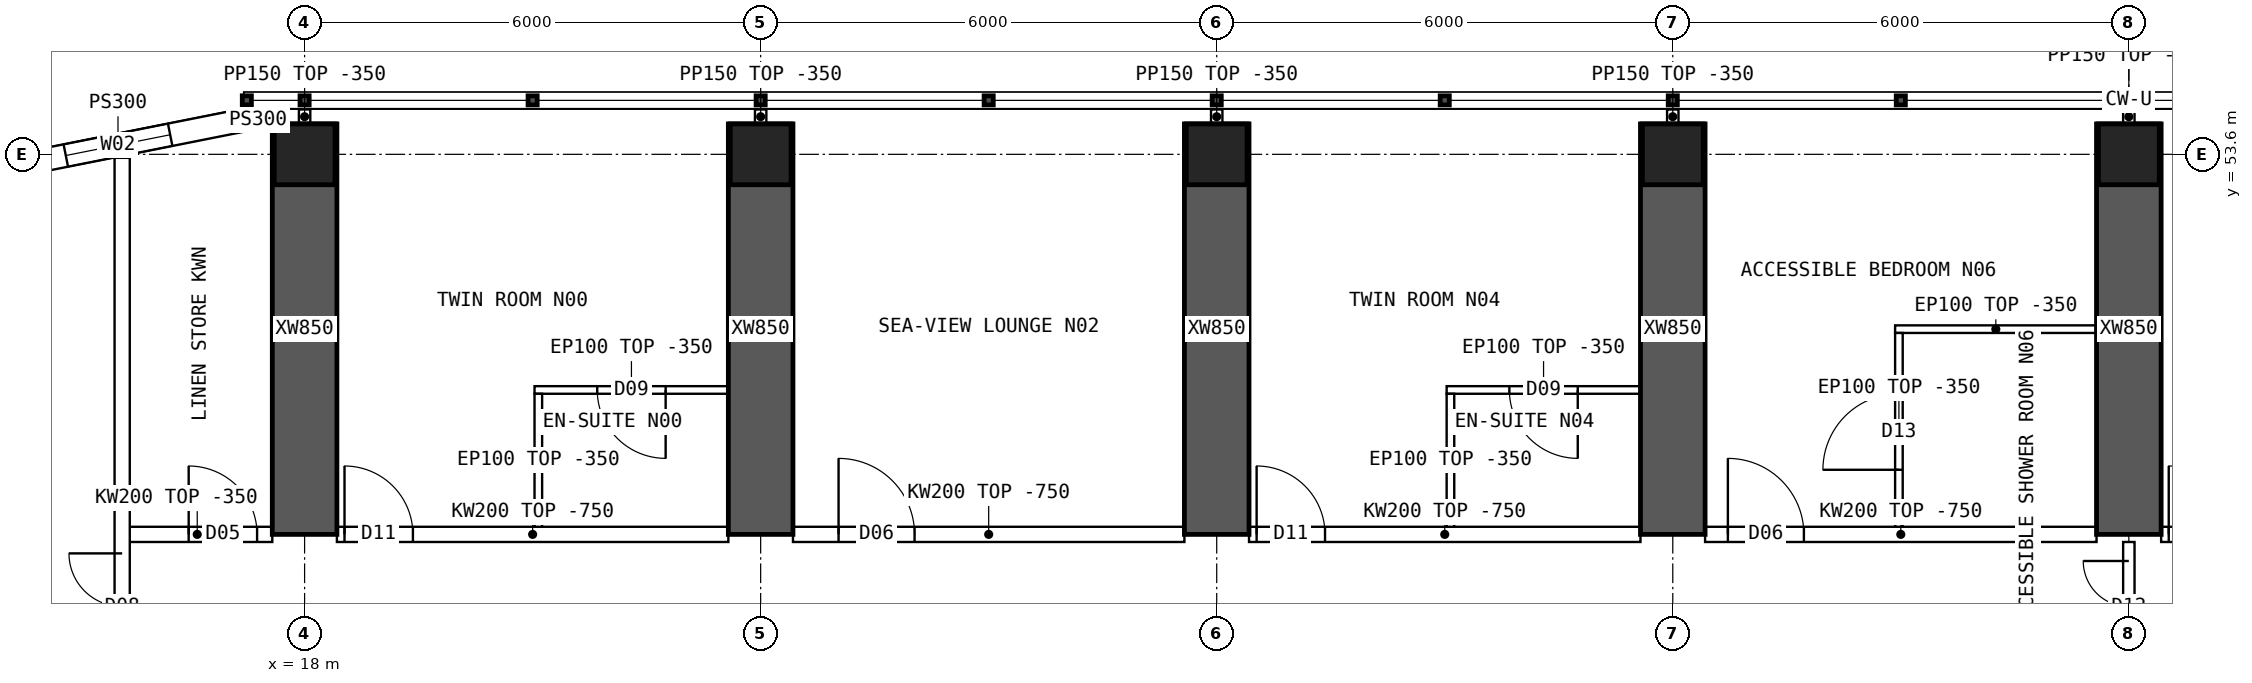
"""IFC4 building model, lengths in metres.
Left out: names, types, materials, properties, quantities, classifications, styles, units other than length and angle.
Written with IfcOpenShell. Run it as: python <this file> out.ifc"""

import sys

from ifc_helpers import new_model, si_unit, direction, frame, frame_2d, origin, origin_2d, place, context, subcontext, project, spatial, polyline, rectangle, hollow_rectangle, outline, extrude, element, fill, save


model = new_model("IFC4")
c1 = context("Model", 3, precision=1e-05, world=origin(), true_north=direction((0.0, 1.0)))
c2 = subcontext(c1, "Body", "Model", "MODEL_VIEW")
j1 = project(units=[si_unit("LENGTHUNIT", "METRE"), si_unit("PLANEANGLEUNIT", "RADIAN")], contexts=[c1])
p1 = place(None, origin())
s1 = spatial("IfcSite", under=j1, at=p1, CompositionType="ELEMENT")
p2 = place(p1, origin())
s2 = spatial("IfcBuilding", under=s1, at=p2, CompositionType="ELEMENT")
p3 = place(p2, frame((0.0, 0.0, 197.35)))
s3 = spatial("IfcBuildingStorey", under=s2, at=p3, CompositionType="ELEMENT", Elevation=197.35)
for number, where, z_axis, x_axis in (
    (1, (18.0, 53.6, 0.0), (0.0, 0.0, 1.0), (1.0, 0.0, 0.0)),
    (2, (24.0, 53.6, 0.0), (0.0, 0.0, 1.0), (1.0, 0.0, 0.0)),
    (3, (30.0, 53.6, 0.0), (0.0, 0.0, 1.0), (1.0, 0.0, 0.0)),
    (4, (36.0, 53.6, 0.0), (0.0, 0.0, 1.0), (1.0, 0.0, 0.0)),
    (5, (42.0, 53.6, 0.0), (0.0, 0.0, 1.0), (1.0, 0.0, 0.0)),
):
    element("IfcColumn", number, at=place(p3, frame(where, z_axis=z_axis, x_axis=x_axis)), inside=s3, PredefinedType="COLUMN", context=c2, shape_type="SweptSolid", body=[
        extrude(hollow_rectangle(XDim=0.8, YDim=0.8, WallThickness=0.08, at=origin_2d()), origin(), (0.0, 0.0, 1.0), 3.75),
    ])
for number, where, z_axis, x_axis in (
    (6, (18.0, 48.6, 0.0), (0.0, 0.0, 1.0), (0.0, 1.0, 0.0)),
    (7, (24.0, 48.6, 0.0), (0.0, 0.0, 1.0), (0.0, 1.0, 0.0)),
    (8, (30.0, 48.6, 0.0), (0.0, 0.0, 1.0), (0.0, 1.0, 0.0)),
    (9, (36.0, 48.6, 0.0), (0.0, 0.0, 1.0), (0.0, 1.0, 0.0)),
    (10, (42.0, 48.6, 0.0), (0.0, 0.0, 1.0), (0.0, 1.0, 0.0)),
):
    element("IfcWall", number, at=place(p3, frame(where, z_axis=z_axis, x_axis=x_axis)), inside=s3, PredefinedType="SHEAR", context=c2, shape_type="SweptSolid", body=[
        extrude(rectangle(XDim=5.4, YDim=0.85, at=frame_2d((2.7, 0.0))), origin(), (0.0, 0.0, 1.0), 3.75),
    ])
p4 = place(p3, frame((17.2, 54.05, 0.0), z_axis=(0.0, 0.0, 1.0), x_axis=(-0.98078325777, -0.195100490205, 0.0)))
e11 = element("IfcWall", 11, at=p4, inside=s3, PredefinedType="SOLIDWALL", context=c2, shape_type="SweptSolid", body=[
    extrude(outline(polyline([(-0.03, -0.15), (3.405, -0.15), (3.345, 0.15), (0.03, 0.15), (-0.03, -0.15)])), origin(), (0.0, 0.0, 1.0), 3.4),
])
p5 = place(p4, frame((0.988, 0.0, 0.9)))
e12 = element("IfcOpeningElement", 12, at=p5, cuts=e11, PredefinedType="OPENING", context=c2, shape_type="SweptSolid", body=[
    extrude(rectangle(XDim=1.4, YDim=1.8, at=frame_2d((0.7, 0.9))), frame((0.0, 0.16, 0.0), z_axis=(0.0, -1.0, 0.0), x_axis=(1.0, 0.0, 0.0)), (0.0, 0.0, 1.0), 0.32),
])
p6 = place(p3, frame((17.2, 54.05, 0.0), z_axis=(0.0, 0.0, 1.0), x_axis=(1.0, 0.0, 0.0)))
e13 = element("IfcWall", 13, at=p6, inside=s3, PredefinedType="SOLIDWALL", context=c2, shape_type="SweptSolid", body=[
    extrude(rectangle(XDim=0.375, YDim=0.3, at=frame_2d((0.188, 0.0))), origin(), (0.0, 0.0, 1.0), 3.4),
])
p7 = place(p3, frame((15.6, 48.6, 0.0), z_axis=(0.0, 0.0, 1.0), x_axis=(1.0, 0.0, 0.0)))
e14 = element("IfcWall", 14, at=p7, inside=s3, PredefinedType="SOLIDWALL", context=c2, shape_type="SweptSolid", body=[
    extrude(rectangle(XDim=1.975, YDim=0.2, at=frame_2d((0.987, 0.0))), origin(), (0.0, 0.0, 1.0), 3.4),
])
p8 = place(p7, frame((0.875, 0.0, 0.0)))
e15 = element("IfcOpeningElement", 15, at=p8, cuts=e14, PredefinedType="OPENING", context=c2, shape_type="SweptSolid", body=[
    extrude(rectangle(XDim=0.9, YDim=2.1, at=frame_2d((0.45, 1.05))), frame((0.0, 0.11, 0.0), z_axis=(0.0, -1.0, 0.0), x_axis=(1.0, 0.0, 0.0)), (0.0, 0.0, 1.0), 0.22),
])
p9 = place(p3, frame((18.425, 48.6, 0.0), z_axis=(0.0, 0.0, 1.0), x_axis=(1.0, 0.0, 0.0)))
e16 = element("IfcWall", 16, at=p9, inside=s3, PredefinedType="SOLIDWALL", context=c2, shape_type="SweptSolid", body=[
    extrude(outline(polyline([(0.0, 0.0), (5.15, 0.0), (5.15, 3.0), (0.0, 3.0), (0.0, 0.0)])), frame((0.0, 0.1, 0.0), z_axis=(0.0, -1.0, 0.0), x_axis=(1.0, 0.0, 0.0)), (0.0, 0.0, 1.0), 0.2),
])
p10 = place(p9, frame((0.1, 0.0, 0.0)))
e17 = element("IfcOpeningElement", 17, at=p10, cuts=e16, PredefinedType="OPENING", context=c2, shape_type="SweptSolid", body=[
    extrude(rectangle(XDim=0.9, YDim=2.1, at=frame_2d((0.45, 1.05))), frame((0.0, 0.11, 0.0), z_axis=(0.0, -1.0, 0.0), x_axis=(1.0, 0.0, 0.0)), (0.0, 0.0, 1.0), 0.22),
])
p11 = place(p3, frame((24.425, 48.6, 0.0), z_axis=(0.0, 0.0, 1.0), x_axis=(1.0, 0.0, 0.0)))
e18 = element("IfcWall", 18, at=p11, inside=s3, PredefinedType="SOLIDWALL", context=c2, shape_type="SweptSolid", body=[
    extrude(outline(polyline([(0.0, 0.0), (5.15, 0.0), (5.15, 3.0), (0.0, 3.0), (0.0, 0.0)])), frame((0.0, 0.1, 0.0), z_axis=(0.0, -1.0, 0.0), x_axis=(1.0, 0.0, 0.0)), (0.0, 0.0, 1.0), 0.2),
])
p12 = place(p11, frame((0.6, 0.0, 0.0)))
e19 = element("IfcOpeningElement", 19, at=p12, cuts=e18, PredefinedType="OPENING", context=c2, shape_type="SweptSolid", body=[
    extrude(rectangle(XDim=1.0, YDim=2.1, at=frame_2d((0.5, 1.05))), frame((0.0, 0.11, 0.0), z_axis=(0.0, -1.0, 0.0), x_axis=(1.0, 0.0, 0.0)), (0.0, 0.0, 1.0), 0.22),
])
p13 = place(p3, frame((30.425, 48.6, 0.0), z_axis=(0.0, 0.0, 1.0), x_axis=(1.0, 0.0, 0.0)))
e20 = element("IfcWall", 20, at=p13, inside=s3, PredefinedType="SOLIDWALL", context=c2, shape_type="SweptSolid", body=[
    extrude(outline(polyline([(0.0, 0.0), (5.15, 0.0), (5.15, 3.0), (0.0, 3.0), (0.0, 0.0)])), frame((0.0, 0.1, 0.0), z_axis=(0.0, -1.0, 0.0), x_axis=(1.0, 0.0, 0.0)), (0.0, 0.0, 1.0), 0.2),
])
p14 = place(p13, frame((0.1, 0.0, 0.0)))
e21 = element("IfcOpeningElement", 21, at=p14, cuts=e20, PredefinedType="OPENING", context=c2, shape_type="SweptSolid", body=[
    extrude(rectangle(XDim=0.9, YDim=2.1, at=frame_2d((0.45, 1.05))), frame((0.0, 0.11, 0.0), z_axis=(0.0, -1.0, 0.0), x_axis=(1.0, 0.0, 0.0)), (0.0, 0.0, 1.0), 0.22),
])
p15 = place(p3, frame((36.425, 48.6, 0.0), z_axis=(0.0, 0.0, 1.0), x_axis=(1.0, 0.0, 0.0)))
e22 = element("IfcWall", 22, at=p15, inside=s3, PredefinedType="SOLIDWALL", context=c2, shape_type="SweptSolid", body=[
    extrude(outline(polyline([(0.0, 0.0), (5.15, 0.0), (5.15, 3.0), (0.0, 3.0), (0.0, 0.0)])), frame((0.0, 0.1, 0.0), z_axis=(0.0, -1.0, 0.0), x_axis=(1.0, 0.0, 0.0)), (0.0, 0.0, 1.0), 0.2),
])
p16 = place(p15, frame((0.3, 0.0, 0.0)))
e23 = element("IfcOpeningElement", 23, at=p16, cuts=e22, PredefinedType="OPENING", context=c2, shape_type="SweptSolid", body=[
    extrude(rectangle(XDim=1.0, YDim=2.1, at=frame_2d((0.5, 1.05))), frame((0.0, 0.11, 0.0), z_axis=(0.0, -1.0, 0.0), x_axis=(1.0, 0.0, 0.0)), (0.0, 0.0, 1.0), 0.22),
])
p17 = place(p3, frame((42.425, 48.6, 0.0), z_axis=(0.0, 0.0, 1.0), x_axis=(1.0, 0.0, 0.0)))
e24 = element("IfcWall", 24, at=p17, inside=s3, PredefinedType="SOLIDWALL", context=c2, shape_type="SweptSolid", body=[
    extrude(outline(polyline([(0.0, 0.0), (5.15, 0.0), (5.15, 3.0), (0.0, 3.0), (0.0, 0.0)])), frame((0.0, 0.1, 0.0), z_axis=(0.0, -1.0, 0.0), x_axis=(1.0, 0.0, 0.0)), (0.0, 0.0, 1.0), 0.2),
])
p18 = place(p17, frame((0.1, 0.0, 0.0)))
e25 = element("IfcOpeningElement", 25, at=p18, cuts=e24, PredefinedType="OPENING", context=c2, shape_type="SweptSolid", body=[
    extrude(rectangle(XDim=0.9, YDim=2.1, at=frame_2d((0.45, 1.05))), frame((0.0, 0.11, 0.0), z_axis=(0.0, -1.0, 0.0), x_axis=(1.0, 0.0, 0.0)), (0.0, 0.0, 1.0), 0.22),
])
p19 = place(p3, frame((21.025, 50.5, 0.0), z_axis=(0.0, 0.0, 1.0), x_axis=(1.0, 0.0, 0.0)))
e26 = element("IfcWall", 26, at=p19, inside=s3, PredefinedType="PARTITIONING", context=c2, shape_type="SweptSolid", body=[
    extrude(rectangle(XDim=2.55, YDim=0.1, at=frame_2d((1.275, 0.0))), origin(), (0.0, 0.0, 1.0), 3.4),
])
p20 = place(p19, frame((0.825, 0.0, 0.0)))
e27 = element("IfcOpeningElement", 27, at=p20, cuts=e26, PredefinedType="OPENING", context=c2, shape_type="SweptSolid", body=[
    extrude(rectangle(XDim=0.9, YDim=2.1, at=frame_2d((0.45, 1.05))), frame((0.0, 0.06, 0.0), z_axis=(0.0, -1.0, 0.0), x_axis=(1.0, 0.0, 0.0)), (0.0, 0.0, 1.0), 0.12),
])
p21 = place(p3, frame((21.075, 50.45, 0.0), z_axis=(0.0, 0.0, 1.0), x_axis=(0.0, -1.0, 0.0)))
e28 = element("IfcWall", 28, at=p21, inside=s3, PredefinedType="PARTITIONING", context=c2, shape_type="SweptSolid", body=[
    extrude(outline(polyline([(0.0, 0.0), (1.75, 0.0), (1.75, 3.0), (1.702, 3.0), (1.7, 3.4), (0.0, 3.4), (0.0, 0.0)])), frame((0.0, 0.05, 0.0), z_axis=(0.0, -1.0, 0.0), x_axis=(1.0, 0.0, 0.0)), (0.0, 0.0, 1.0), 0.1),
])
p22 = place(p3, frame((33.025, 50.5, 0.0), z_axis=(0.0, 0.0, 1.0), x_axis=(1.0, 0.0, 0.0)))
e29 = element("IfcWall", 29, at=p22, inside=s3, PredefinedType="PARTITIONING", context=c2, shape_type="SweptSolid", body=[
    extrude(rectangle(XDim=2.55, YDim=0.1, at=frame_2d((1.275, 0.0))), origin(), (0.0, 0.0, 1.0), 3.4),
])
p23 = place(p22, frame((0.825, 0.0, 0.0)))
e30 = element("IfcOpeningElement", 30, at=p23, cuts=e29, PredefinedType="OPENING", context=c2, shape_type="SweptSolid", body=[
    extrude(rectangle(XDim=0.9, YDim=2.1, at=frame_2d((0.45, 1.05))), frame((0.0, 0.06, 0.0), z_axis=(0.0, -1.0, 0.0), x_axis=(1.0, 0.0, 0.0)), (0.0, 0.0, 1.0), 0.12),
])
p24 = place(p3, frame((33.075, 50.45, 0.0), z_axis=(0.0, 0.0, 1.0), x_axis=(0.0, -1.0, 0.0)))
e31 = element("IfcWall", 31, at=p24, inside=s3, PredefinedType="PARTITIONING", context=c2, shape_type="SweptSolid", body=[
    extrude(outline(polyline([(0.0, 0.0), (1.75, 0.0), (1.75, 3.0), (1.702, 3.0), (1.7, 3.4), (0.0, 3.4), (0.0, 0.0)])), frame((0.0, 0.05, 0.0), z_axis=(0.0, -1.0, 0.0), x_axis=(1.0, 0.0, 0.0)), (0.0, 0.0, 1.0), 0.1),
])
p25 = place(p3, frame((38.925, 51.3, 0.0), z_axis=(0.0, 0.0, 1.0), x_axis=(1.0, 0.0, 0.0)))
e32 = element("IfcWall", 32, at=p25, inside=s3, PredefinedType="PARTITIONING", context=c2, shape_type="SweptSolid", body=[
    extrude(rectangle(XDim=2.65, YDim=0.1, at=frame_2d((1.325, 0.0))), origin(), (0.0, 0.0, 1.0), 3.4),
])
p26 = place(p3, frame((38.975, 51.25, 0.0), z_axis=(0.0, 0.0, 1.0), x_axis=(0.0, -1.0, 0.0)))
e33 = element("IfcWall", 33, at=p26, inside=s3, PredefinedType="PARTITIONING", context=c2, shape_type="SweptSolid", body=[
    extrude(outline(polyline([(0.0, 0.0), (2.55, 0.0), (2.55, 3.0), (2.502, 3.0), (2.5, 3.4), (0.0, 3.4), (0.0, 0.0)])), frame((0.0, 0.05, 0.0), z_axis=(0.0, -1.0, 0.0), x_axis=(1.0, 0.0, 0.0)), (0.0, 0.0, 1.0), 0.1),
])
p27 = place(p26, frame((0.8, 0.0, 0.0)))
e34 = element("IfcOpeningElement", 34, at=p27, cuts=e33, PredefinedType="OPENING", context=c2, shape_type="SweptSolid", body=[
    extrude(rectangle(XDim=1.0, YDim=2.1, at=frame_2d((0.5, 1.05))), frame((0.0, 0.06, 0.0), z_axis=(0.0, -1.0, 0.0), x_axis=(1.0, 0.0, 0.0)), (0.0, 0.0, 1.0), 0.12),
])
p28 = place(p3, frame((42.0, 46.8, 0.0), z_axis=(0.0, 0.0, 1.0), x_axis=(0.0, 1.0, 0.0)))
e35 = element("IfcWall", 35, at=p28, inside=s3, PredefinedType="PARTITIONING", context=c2, shape_type="SweptSolid", body=[
    extrude(outline(polyline([(0.0, 0.0), (1.7, 0.0), (1.7, 3.0), (0.0, 3.0), (0.0, 0.0)])), frame((0.0, 0.075, 0.0), z_axis=(0.0, -1.0, 0.0), x_axis=(1.0, 0.0, 0.0)), (0.0, 0.0, 1.0), 0.15),
])
p29 = place(p28, frame((0.25, 0.0, 0.0)))
e36 = element("IfcOpeningElement", 36, at=p29, cuts=e35, PredefinedType="OPENING", context=c2, shape_type="SweptSolid", body=[
    extrude(rectangle(XDim=1.2, YDim=2.1, at=frame_2d((0.6, 1.05))), frame((0.0, 0.085, 0.0), z_axis=(0.0, -1.0, 0.0), x_axis=(1.0, 0.0, 0.0)), (0.0, 0.0, 1.0), 0.17),
])
p30 = place(p3, frame((15.6, 10.446, 0.0), z_axis=(0.0, 0.0, 1.0), x_axis=(0.0, 1.0, 0.0)))
e37 = element("IfcWall", 37, at=p30, inside=s3, PredefinedType="SOLIDWALL", context=c2, shape_type="SweptSolid", body=[
    extrude(rectangle(XDim=43.107, YDim=0.2, at=frame_2d((21.554, 0.0))), origin(), (0.0, 0.0, 1.0), 3.4),
])
p31 = place(p30, frame((5.104, 0.0, 0.0)))
e38 = element("IfcOpeningElement", 38, at=p31, cuts=e37, PredefinedType="OPENING", context=c2, shape_type="SweptSolid", body=[
    extrude(rectangle(XDim=1.4, YDim=2.1, at=frame_2d((0.7, 1.05))), frame((0.0, 0.11, 0.0), z_axis=(0.0, -1.0, 0.0), x_axis=(1.0, 0.0, 0.0)), (0.0, 0.0, 1.0), 0.22),
])
p32 = place(p30, frame((36.504, 0.0, 0.0)))
e39 = element("IfcOpeningElement", 39, at=p32, cuts=e37, PredefinedType="OPENING", context=c2, shape_type="SweptSolid", body=[
    extrude(rectangle(XDim=1.4, YDim=2.1, at=frame_2d((0.7, 1.05))), frame((0.0, 0.11, 0.0), z_axis=(0.0, -1.0, 0.0), x_axis=(1.0, 0.0, 0.0)), (0.0, 0.0, 1.0), 0.22),
])
for number, where, z_axis, x_axis in (
    (40, (18.0, 54.0, 0.0), (0.0, 0.0, 1.0), (0.0, 1.0, 0.0)),
    (41, (24.0, 54.0, 0.0), (0.0, 0.0, 1.0), (0.0, 1.0, 0.0)),
    (42, (30.0, 54.0, 0.0), (0.0, 0.0, 1.0), (0.0, 1.0, 0.0)),
    (43, (36.0, 54.0, 0.0), (0.0, 0.0, 1.0), (0.0, 1.0, 0.0)),
    (44, (42.0, 54.0, 0.0), (0.0, 0.0, 1.0), (0.0, 1.0, 0.0)),
):
    element("IfcWall", number, at=place(p3, frame(where, z_axis=z_axis, x_axis=x_axis)), inside=s3, PredefinedType="PARTITIONING", context=c2, shape_type="SweptSolid", body=[
        extrude(rectangle(XDim=0.19, YDim=0.15, at=frame_2d((0.095, 0.0))), origin(), (0.0, 0.0, 1.0), 3.4),
    ])
p33 = place(p5, origin())
e45 = element("IfcWindow", 45, at=p33, inside=s3, PartitioningType="SINGLE_PANEL", PredefinedType="WINDOW", context=c2, shape_type="SweptSolid", body=[
    extrude(rectangle(XDim=1.4, YDim=1.8, at=frame_2d((0.7, 0.9))), frame((0.0, 0.03, 0.0), z_axis=(0.0, -1.0, 0.0), x_axis=(1.0, 0.0, 0.0)), (0.0, 0.0, 1.0), 0.06),
])
fill(e12, e45)
p34 = place(p20, origin())
e46 = element("IfcDoor", 46, at=p34, inside=s3, OperationType="SINGLE_SWING_RIGHT", PredefinedType="DOOR", context=c2, shape_type="SweptSolid", body=[
    extrude(rectangle(XDim=0.9, YDim=2.1, at=frame_2d((0.45, 1.05))), frame((0.0, 0.025, 0.0), z_axis=(0.0, -1.0, 0.0), x_axis=(1.0, 0.0, 0.0)), (0.0, 0.0, 1.0), 0.05),
])
fill(e27, e46)
p35 = place(p10, origin())
e47 = element("IfcDoor", 47, at=p35, inside=s3, OperationType="SINGLE_SWING_LEFT", PredefinedType="DOOR", context=c2, shape_type="SweptSolid", body=[
    extrude(rectangle(XDim=0.9, YDim=2.1, at=frame_2d((0.45, 1.05))), frame((0.0, 0.025, 0.0), z_axis=(0.0, -1.0, 0.0), x_axis=(1.0, 0.0, 0.0)), (0.0, 0.0, 1.0), 0.05),
])
fill(e17, e47)
p36 = place(p12, origin())
e48 = element("IfcDoor", 48, at=p36, inside=s3, OperationType="SINGLE_SWING_LEFT", PredefinedType="DOOR", context=c2, shape_type="SweptSolid", body=[
    extrude(rectangle(XDim=1.0, YDim=2.1, at=frame_2d((0.5, 1.05))), frame((0.0, 0.025, 0.0), z_axis=(0.0, -1.0, 0.0), x_axis=(1.0, 0.0, 0.0)), (0.0, 0.0, 1.0), 0.05),
])
fill(e19, e48)
p37 = place(p23, origin())
e49 = element("IfcDoor", 49, at=p37, inside=s3, OperationType="SINGLE_SWING_RIGHT", PredefinedType="DOOR", context=c2, shape_type="SweptSolid", body=[
    extrude(rectangle(XDim=0.9, YDim=2.1, at=frame_2d((0.45, 1.05))), frame((0.0, 0.025, 0.0), z_axis=(0.0, -1.0, 0.0), x_axis=(1.0, 0.0, 0.0)), (0.0, 0.0, 1.0), 0.05),
])
fill(e30, e49)
p38 = place(p14, origin())
e50 = element("IfcDoor", 50, at=p38, inside=s3, OperationType="SINGLE_SWING_LEFT", PredefinedType="DOOR", context=c2, shape_type="SweptSolid", body=[
    extrude(rectangle(XDim=0.9, YDim=2.1, at=frame_2d((0.45, 1.05))), frame((0.0, 0.025, 0.0), z_axis=(0.0, -1.0, 0.0), x_axis=(1.0, 0.0, 0.0)), (0.0, 0.0, 1.0), 0.05),
])
fill(e21, e50)
p39 = place(p27, origin())
e51 = element("IfcDoor", 51, at=p39, inside=s3, OperationType="SINGLE_SWING_RIGHT", PredefinedType="DOOR", context=c2, shape_type="SweptSolid", body=[
    extrude(rectangle(XDim=1.0, YDim=2.1, at=frame_2d((0.5, 1.05))), frame((0.0, 0.025, 0.0), z_axis=(0.0, -1.0, 0.0), x_axis=(1.0, 0.0, 0.0)), (0.0, 0.0, 1.0), 0.05),
])
fill(e34, e51)
p40 = place(p16, origin())
e52 = element("IfcDoor", 52, at=p40, inside=s3, OperationType="SINGLE_SWING_LEFT", PredefinedType="DOOR", context=c2, shape_type="SweptSolid", body=[
    extrude(rectangle(XDim=1.0, YDim=2.1, at=frame_2d((0.5, 1.05))), frame((0.0, 0.025, 0.0), z_axis=(0.0, -1.0, 0.0), x_axis=(1.0, 0.0, 0.0)), (0.0, 0.0, 1.0), 0.05),
])
fill(e23, e52)
p41 = place(p18, origin())
e53 = element("IfcDoor", 53, at=p41, inside=s3, OperationType="SINGLE_SWING_LEFT", PredefinedType="DOOR", context=c2, shape_type="SweptSolid", body=[
    extrude(rectangle(XDim=0.9, YDim=2.1, at=frame_2d((0.45, 1.05))), frame((0.0, 0.025, 0.0), z_axis=(0.0, -1.0, 0.0), x_axis=(1.0, 0.0, 0.0)), (0.0, 0.0, 1.0), 0.05),
])
fill(e25, e53)
p42 = place(p29, origin())
e54 = element("IfcDoor", 54, at=p42, inside=s3, OperationType="DOUBLE_DOOR_SINGLE_SWING", PredefinedType="DOOR", context=c2, shape_type="SweptSolid", body=[
    extrude(rectangle(XDim=1.2, YDim=2.1, at=frame_2d((0.6, 1.05))), frame((0.0, 0.025, 0.0), z_axis=(0.0, -1.0, 0.0), x_axis=(1.0, 0.0, 0.0)), (0.0, 0.0, 1.0), 0.05),
])
fill(e36, e54)
p43 = place(p32, origin())
e55 = element("IfcDoor", 55, at=p43, inside=s3, OperationType="DOUBLE_DOOR_SINGLE_SWING", PredefinedType="DOOR", context=c2, shape_type="SweptSolid", body=[
    extrude(rectangle(XDim=1.4, YDim=2.1, at=frame_2d((0.7, 1.05))), frame((0.0, 0.025, 0.0), z_axis=(0.0, -1.0, 0.0), x_axis=(1.0, 0.0, 0.0)), (0.0, 0.0, 1.0), 0.05),
])
fill(e39, e55)
p44 = place(p8, origin())
e56 = element("IfcDoor", 56, at=p44, inside=s3, OperationType="SINGLE_SWING_LEFT", PredefinedType="DOOR", context=c2, shape_type="SweptSolid", body=[
    extrude(rectangle(XDim=0.9, YDim=2.1, at=frame_2d((0.45, 1.05))), frame((0.0, 0.025, 0.0), z_axis=(0.0, -1.0, 0.0), x_axis=(1.0, 0.0, 0.0)), (0.0, 0.0, 1.0), 0.05),
])
fill(e15, e56)
save(model, sys.argv[1])
